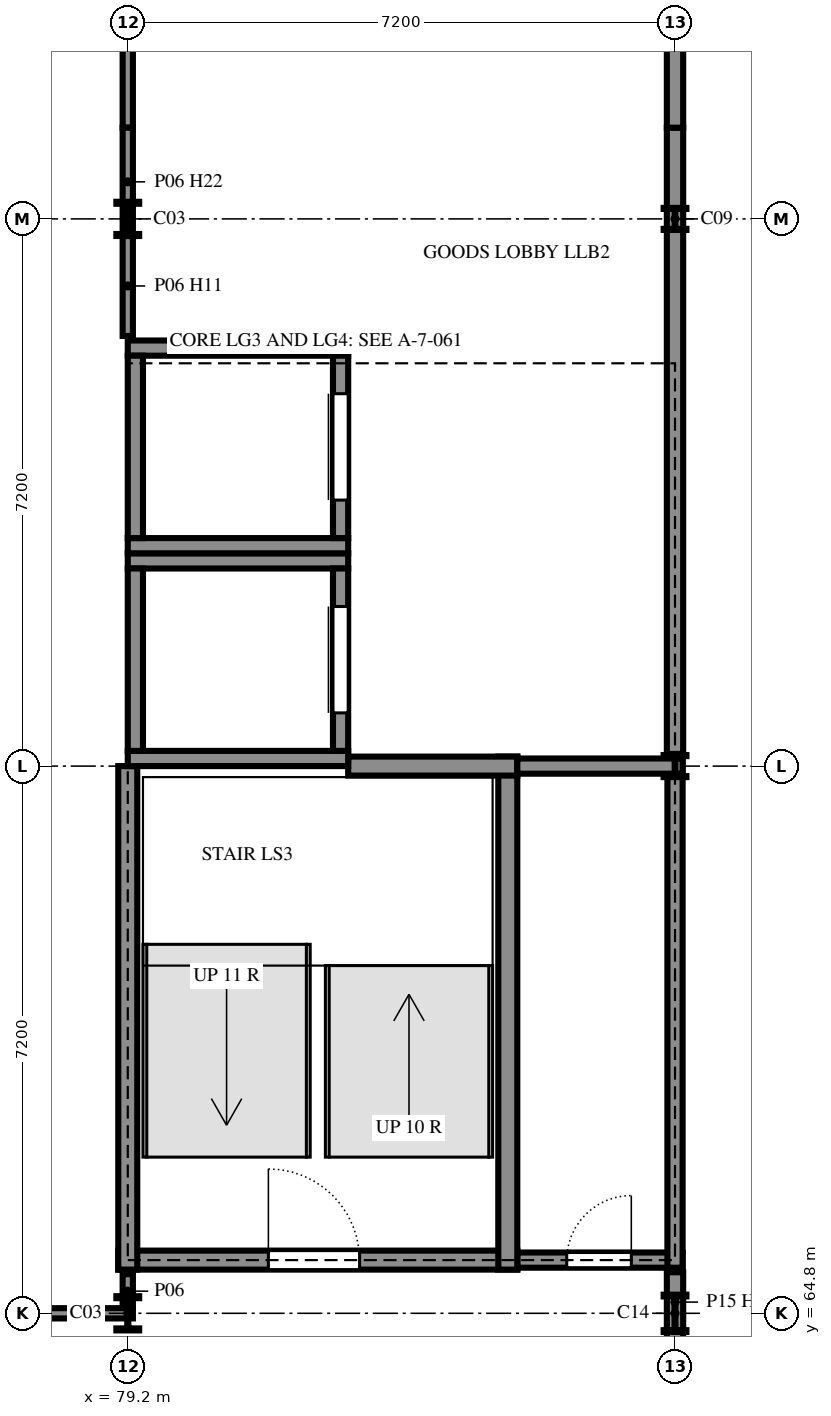
"""IFC4 building model, lengths in metres.
Left out: names, types, materials, properties, quantities, classifications, styles, units other than length and angle.
Written with IfcOpenShell. Run it as: python <this file> out.ifc"""

import sys

from ifc_helpers import new_model, si_unit, direction, frame, frame_2d, origin, origin_2d, place, context, subcontext, project, spatial, rectangle, i_section, extrude, element, fill, save


model = new_model("IFC4")
c1 = context("Model", 3, precision=1e-05, world=origin(), true_north=direction((0.0, 1.0)))
c2 = subcontext(c1, "Body", "Model", "MODEL_VIEW")
j1 = project(units=[si_unit("LENGTHUNIT", "METRE"), si_unit("PLANEANGLEUNIT", "RADIAN")], contexts=[c1])
p1 = place(None, origin())
s1 = spatial("IfcSite", under=j1, at=p1, CompositionType="ELEMENT")
p2 = place(p1, origin())
s2 = spatial("IfcBuilding", under=s1, at=p2, CompositionType="ELEMENT")
p3 = place(p2, frame((0.0, 0.0, 10.8)))
s3 = spatial("IfcBuildingStorey", under=s2, at=p3, CompositionType="ELEMENT", Elevation=10.8)
for number, where, z_axis, x_axis in (
    (1, (79.2, 64.8, 0.0), (0.0, 0.0, 1.0), (1.0, 0.0, 0.0)),
    (2, (79.2, 79.2, 0.0), (0.0, 0.0, 1.0), (1.0, 0.0, 0.0)),
):
    element("IfcColumn", number, at=place(p3, frame(where, z_axis=z_axis, x_axis=x_axis)), inside=s3, PredefinedType="COLUMN", context=c2, shape_type="SweptSolid", body=[
        extrude(i_section(OverallWidth=0.3, OverallDepth=0.45, WebThickness=0.014, FlangeThickness=0.026, FilletRadius=0.027, at=origin_2d()), origin(), (0.0, 0.0, 1.0), 3.6),
    ])
p4 = place(p3, frame((86.4, 64.8, 0.0), z_axis=(0.0, 0.0, 1.0), x_axis=(1.0, 0.0, 0.0)))
e3 = element("IfcColumn", 3, at=p4, inside=s3, PredefinedType="COLUMN", context=c2, shape_type="SweptSolid", body=[
    extrude(i_section(OverallWidth=0.3, OverallDepth=0.49, WebThickness=0.012, FlangeThickness=0.023, FilletRadius=0.027, at=origin_2d()), origin(), (0.0, 0.0, 1.0), 3.6),
])
for number, where, z_axis, x_axis in (
    (4, (86.4, 72.0, 0.0), (0.0, 0.0, 1.0), (1.0, 0.0, 0.0)),
    (5, (86.4, 79.2, 0.0), (0.0, 0.0, 1.0), (1.0, 0.0, 0.0)),
):
    element("IfcColumn", number, at=place(p3, frame(where, z_axis=z_axis, x_axis=x_axis)), inside=s3, PredefinedType="COLUMN", context=c2, shape_type="SweptSolid", body=[
        extrude(i_section(OverallWidth=0.3, OverallDepth=0.29, WebThickness=0.009, FlangeThickness=0.014, FilletRadius=0.027, at=origin_2d()), origin(), (0.0, 0.0, 1.0), 3.6),
    ])
p5 = place(p3, frame((79.075, 65.5, 0.0), z_axis=(0.0, 0.0, 1.0), x_axis=(1.0, 0.0, 0.0)))
e6 = element("IfcWall", 6, at=p5, inside=s3, PredefinedType="SHEAR", context=c2, shape_type="SweptSolid", body=[
    extrude(rectangle(XDim=5.25, YDim=0.25, at=frame_2d((2.625, 0.0))), origin(), (0.0, 0.0, 1.0), 3.6),
])
p6 = place(p5, frame((1.975, 0.0, 0.0)))
e7 = element("IfcOpeningElement", 7, at=p6, cuts=e6, PredefinedType="OPENING", context=c2, shape_type="SweptSolid", body=[
    extrude(rectangle(XDim=1.2, YDim=2.4, at=frame_2d((0.6, 1.2))), frame((0.0, 0.135, 0.0), z_axis=(0.0, -1.0, 0.0), x_axis=(1.0, 0.0, 0.0)), (0.0, 0.0, 1.0), 0.27),
])
p7 = place(p3, frame((84.325, 65.5, 0.0), z_axis=(0.0, 0.0, 1.0), x_axis=(1.0, 0.0, 0.0)))
e8 = element("IfcWall", 8, at=p7, inside=s3, PredefinedType="SHEAR", context=c2, shape_type="SweptSolid", body=[
    extrude(rectangle(XDim=2.175, YDim=0.2, at=frame_2d((1.087, 0.0))), origin(), (0.0, 0.0, 1.0), 3.6),
])
p8 = place(p7, frame((0.65, 0.0, 0.0)))
e9 = element("IfcOpeningElement", 9, at=p8, cuts=e8, PredefinedType="OPENING", context=c2, shape_type="SweptSolid", body=[
    extrude(rectangle(XDim=0.85, YDim=2.1, at=frame_2d((0.425, 1.05))), frame((0.0, 0.11, 0.0), z_axis=(0.0, -1.0, 0.0), x_axis=(1.0, 0.0, 0.0)), (0.0, 0.0, 1.0), 0.22),
])
p9 = place(p3, frame((84.2, 65.375, 0.0), z_axis=(0.0, 0.0, 1.0), x_axis=(0.0, 1.0, 0.0)))
e10 = element("IfcWall", 10, at=p9, inside=s3, PredefinedType="SHEAR", context=c2, shape_type="SweptSolid", body=[
    extrude(rectangle(XDim=6.75, YDim=0.25, at=frame_2d((3.375, 0.0))), origin(), (0.0, 0.0, 1.0), 3.6),
])
p10 = place(p3, frame((86.4, 65.4, 0.0), z_axis=(0.0, 0.0, 1.0), x_axis=(0.0, 1.0, 0.0)))
e11 = element("IfcWall", 11, at=p10, inside=s3, PredefinedType="SHEAR", context=c2, shape_type="SweptSolid", body=[
    extrude(rectangle(XDim=6.7, YDim=0.2, at=frame_2d((3.35, 0.0))), origin(), (0.0, 0.0, 1.0), 3.6),
])
p11 = place(p3, frame((79.2, 72.0, 0.0), z_axis=(0.0, 0.0, 1.0), x_axis=(0.0, -1.0, 0.0)))
e12 = element("IfcWall", 12, at=p11, inside=s3, PredefinedType="SHEAR", context=c2, shape_type="SweptSolid", body=[
    extrude(rectangle(XDim=6.625, YDim=0.25, at=frame_2d((3.312, 0.0))), origin(), (0.0, 0.0, 1.0), 3.6),
])
p12 = place(p3, frame((82.1, 72.0, 0.0), z_axis=(0.0, 0.0, 1.0), x_axis=(1.0, 0.0, 0.0)))
e13 = element("IfcWall", 13, at=p12, inside=s3, PredefinedType="SHEAR", context=c2, shape_type="SweptSolid", body=[
    extrude(rectangle(XDim=2.225, YDim=0.25, at=frame_2d((1.112, 0.0))), origin(), (0.0, 0.0, 1.0), 3.6),
])
p13 = place(p3, frame((86.5, 72.0, 0.0), z_axis=(0.0, 0.0, 1.0), x_axis=(-1.0, 0.0, 0.0)))
e14 = element("IfcWall", 14, at=p13, inside=s3, PredefinedType="SHEAR", context=c2, shape_type="SweptSolid", body=[
    extrude(rectangle(XDim=2.175, YDim=0.2, at=frame_2d((1.087, 0.0))), origin(), (0.0, 0.0, 1.0), 3.6),
])
for number, where, z_axis, x_axis in (
    (15, (79.2, 72.1, 0.0), (0.0, 0.0, 1.0), (1.0, 0.0, 0.0)),
    (16, (79.2, 74.7, 0.0), (0.0, 0.0, 1.0), (1.0, 0.0, 0.0)),
):
    element("IfcWall", number, at=place(p3, frame(where, z_axis=z_axis, x_axis=x_axis)), inside=s3, PredefinedType="SHEAR", context=c2, shape_type="SweptSolid", body=[
        extrude(rectangle(XDim=2.9, YDim=0.2, at=frame_2d((1.45, 0.0))), origin(), (0.0, 0.0, 1.0), 3.6),
    ])
p14 = place(p3, frame((79.3, 72.2, 0.0), z_axis=(0.0, 0.0, 1.0), x_axis=(0.0, 1.0, 0.0)))
e17 = element("IfcWall", 17, at=p14, inside=s3, PredefinedType="SHEAR", context=c2, shape_type="SweptSolid", body=[
    extrude(rectangle(XDim=2.4, YDim=0.2, at=frame_2d((1.2, 0.0))), origin(), (0.0, 0.0, 1.0), 3.6),
])
p15 = place(p3, frame((82.0, 72.2, 0.0), z_axis=(0.0, 0.0, 1.0), x_axis=(0.0, 1.0, 0.0)))
e18 = element("IfcWall", 18, at=p15, inside=s3, PredefinedType="SHEAR", context=c2, shape_type="SweptSolid", body=[
    extrude(rectangle(XDim=2.4, YDim=0.2, at=frame_2d((1.2, 0.0))), origin(), (0.0, 0.0, 1.0), 3.6),
])
p16 = place(p15, frame((0.5, 0.0, 0.0)))
e19 = element("IfcOpeningElement", 19, at=p16, cuts=e18, PredefinedType="OPENING", context=c2, shape_type="SweptSolid", body=[
    extrude(rectangle(XDim=1.4, YDim=2.1, at=frame_2d((0.7, 1.05))), frame((0.0, 0.11, 0.0), z_axis=(0.0, -1.0, 0.0), x_axis=(1.0, 0.0, 0.0)), (0.0, 0.0, 1.0), 0.22),
])
for number, where, z_axis, x_axis in (
    (20, (79.2, 74.9, 0.0), (0.0, 0.0, 1.0), (1.0, 0.0, 0.0)),
    (21, (79.2, 77.5, 0.0), (0.0, 0.0, 1.0), (1.0, 0.0, 0.0)),
):
    element("IfcWall", number, at=place(p3, frame(where, z_axis=z_axis, x_axis=x_axis)), inside=s3, PredefinedType="SHEAR", context=c2, shape_type="SweptSolid", body=[
        extrude(rectangle(XDim=2.9, YDim=0.2, at=frame_2d((1.45, 0.0))), origin(), (0.0, 0.0, 1.0), 3.6),
    ])
p17 = place(p3, frame((79.3, 75.0, 0.0), z_axis=(0.0, 0.0, 1.0), x_axis=(0.0, 1.0, 0.0)))
e22 = element("IfcWall", 22, at=p17, inside=s3, PredefinedType="SHEAR", context=c2, shape_type="SweptSolid", body=[
    extrude(rectangle(XDim=2.4, YDim=0.2, at=frame_2d((1.2, 0.0))), origin(), (0.0, 0.0, 1.0), 3.6),
])
p18 = place(p3, frame((82.0, 75.0, 0.0), z_axis=(0.0, 0.0, 1.0), x_axis=(0.0, 1.0, 0.0)))
e23 = element("IfcWall", 23, at=p18, inside=s3, PredefinedType="SHEAR", context=c2, shape_type="SweptSolid", body=[
    extrude(rectangle(XDim=2.4, YDim=0.2, at=frame_2d((1.2, 0.0))), origin(), (0.0, 0.0, 1.0), 3.6),
])
p19 = place(p18, frame((0.5, 0.0, 0.0)))
e24 = element("IfcOpeningElement", 24, at=p19, cuts=e23, PredefinedType="OPENING", context=c2, shape_type="SweptSolid", body=[
    extrude(rectangle(XDim=1.4, YDim=2.1, at=frame_2d((0.7, 1.05))), frame((0.0, 0.11, 0.0), z_axis=(0.0, -1.0, 0.0), x_axis=(1.0, 0.0, 0.0)), (0.0, 0.0, 1.0), 0.22),
])
p20 = place(p3, frame((79.2, 65.315, 0.0), z_axis=(0.0, 0.0, 1.0), x_axis=(0.0, -1.0, 0.0)))
e25 = element("IfcWall", 25, at=p20, inside=s3, PredefinedType="PARTITIONING", context=c2, shape_type="SweptSolid", body=[
    extrude(rectangle(XDim=0.448, YDim=0.135, at=frame_2d((0.224, 0.0))), origin(), (0.0, 0.0, 1.0), 3.42),
])
p21 = place(p3, frame((79.2, 77.66, 0.0), z_axis=(0.0, 0.0, 1.0), x_axis=(0.0, 1.0, 0.0)))
e26 = element("IfcWall", 26, at=p21, inside=s3, PredefinedType="PARTITIONING", context=c2, shape_type="SweptSolid", body=[
    extrude(rectangle(XDim=1.315, YDim=0.135, at=frame_2d((0.658, 0.0))), origin(), (0.0, 0.0, 1.0), 3.22),
])
p22 = place(p3, frame((86.4, 80.4, 0.0), z_axis=(0.0, 0.0, 1.0), x_axis=(0.0, -1.0, 0.0)))
e27 = element("IfcWall", 27, at=p22, inside=s3, PredefinedType="PARTITIONING", context=c2, shape_type="SweptSolid", body=[
    extrude(rectangle(XDim=8.24, YDim=0.215, at=frame_2d((4.12, 0.0))), origin(), (0.0, 0.0, 1.0), 3.12),
])
p23 = place(p3, frame((79.2, 86.262, 0.0), z_axis=(0.0, 0.0, 1.0), x_axis=(0.0, -1.0, 0.0)))
e28 = element("IfcWall", 28, at=p23, inside=s3, PredefinedType="PARTITIONING", context=c2, shape_type="SweptSolid", body=[
    extrude(rectangle(XDim=5.863, YDim=0.135, at=frame_2d((2.931, 0.0))), origin(), (0.0, 0.0, 1.0), 2.87),
])
p24 = place(p3, frame((86.4, 80.4, 0.0), z_axis=(0.0, 0.0, 1.0), x_axis=(0.0, 1.0, 0.0)))
e29 = element("IfcWall", 29, at=p24, inside=s3, PredefinedType="PARTITIONING", context=c2, shape_type="SweptSolid", body=[
    extrude(rectangle(XDim=11.34, YDim=0.215, at=frame_2d((5.67, 0.0))), origin(), (0.0, 0.0, 1.0), 3.12),
])
p25 = place(p3, frame((79.268, 64.8, 0.0), z_axis=(0.0, 0.0, 1.0), x_axis=(-1.0, 0.0, 0.0)))
e30 = element("IfcWall", 30, at=p25, inside=s3, PredefinedType="PARTITIONING", context=c2, shape_type="SweptSolid", body=[
    extrude(rectangle(XDim=7.935, YDim=0.135, at=frame_2d((3.968, 0.0))), origin(), (0.0, 0.0, 1.0), 2.82),
])
p26 = place(p3, frame((86.4, 57.845, 0.0), z_axis=(0.0, 0.0, 1.0), x_axis=(0.0, 1.0, 0.0)))
e31 = element("IfcWall", 31, at=p26, inside=s3, PredefinedType="PARTITIONING", context=c2, shape_type="SweptSolid", body=[
    extrude(rectangle(XDim=6.71, YDim=0.215, at=frame_2d((3.355, 0.0))), origin(), (0.0, 0.0, 1.0), 3.12),
])
p27 = place(p3, frame((86.4, 64.555, 0.0), z_axis=(0.0, 0.0, 1.0), x_axis=(0.0, 1.0, 0.0)))
e32 = element("IfcWall", 32, at=p27, inside=s3, PredefinedType="PARTITIONING", context=c2, shape_type="SweptSolid", body=[
    extrude(rectangle(XDim=0.785, YDim=0.215, at=frame_2d((0.393, 0.0))), origin(), (0.0, 0.0, 1.0), 3.6),
])
p28 = place(p3, frame((79.2, 78.975, 0.0), z_axis=(0.0, 0.0, 1.0), x_axis=(0.0, 1.0, 0.0)))
e33 = element("IfcWall", 33, at=p28, inside=s3, PredefinedType="PARTITIONING", context=c2, shape_type="SweptSolid", body=[
    extrude(rectangle(XDim=1.425, YDim=0.135, at=frame_2d((0.712, 0.0))), origin(), (0.0, 0.0, 1.0), 2.87),
])
p29 = place(p16, origin())
e34 = element("IfcDoor", 34, at=p29, inside=s3, OperationType="SLIDING_TO_LEFT", PredefinedType="DOOR", context=c2, shape_type="SweptSolid", body=[
    extrude(rectangle(XDim=1.4, YDim=2.1, at=frame_2d((0.7, 1.05))), frame((0.0, 0.025, 0.0), z_axis=(0.0, -1.0, 0.0), x_axis=(1.0, 0.0, 0.0)), (0.0, 0.0, 1.0), 0.05),
])
fill(e19, e34)
p30 = place(p19, origin())
e35 = element("IfcDoor", 35, at=p30, inside=s3, OperationType="SLIDING_TO_LEFT", PredefinedType="DOOR", context=c2, shape_type="SweptSolid", body=[
    extrude(rectangle(XDim=1.4, YDim=2.1, at=frame_2d((0.7, 1.05))), frame((0.0, 0.025, 0.0), z_axis=(0.0, -1.0, 0.0), x_axis=(1.0, 0.0, 0.0)), (0.0, 0.0, 1.0), 0.05),
])
fill(e24, e35)
p31 = place(p6, origin())
e36 = element("IfcDoor", 36, at=p31, inside=s3, OperationType="SINGLE_SWING_RIGHT", PredefinedType="DOOR", context=c2, shape_type="SweptSolid", body=[
    extrude(rectangle(XDim=1.2, YDim=2.4, at=frame_2d((0.6, 1.2))), frame((0.0, 0.025, 0.0), z_axis=(0.0, -1.0, 0.0), x_axis=(1.0, 0.0, 0.0)), (0.0, 0.0, 1.0), 0.05),
])
fill(e7, e36)
p32 = place(p8, origin())
e37 = element("IfcDoor", 37, at=p32, inside=s3, OperationType="SINGLE_SWING_LEFT", PredefinedType="DOOR", context=c2, shape_type="SweptSolid", body=[
    extrude(rectangle(XDim=0.85, YDim=2.1, at=frame_2d((0.425, 1.05))), frame((0.0, 0.025, 0.0), z_axis=(0.0, -1.0, 0.0), x_axis=(1.0, 0.0, 0.0)), (0.0, 0.0, 1.0), 0.05),
])
fill(e9, e37)
save(model, sys.argv[1])
